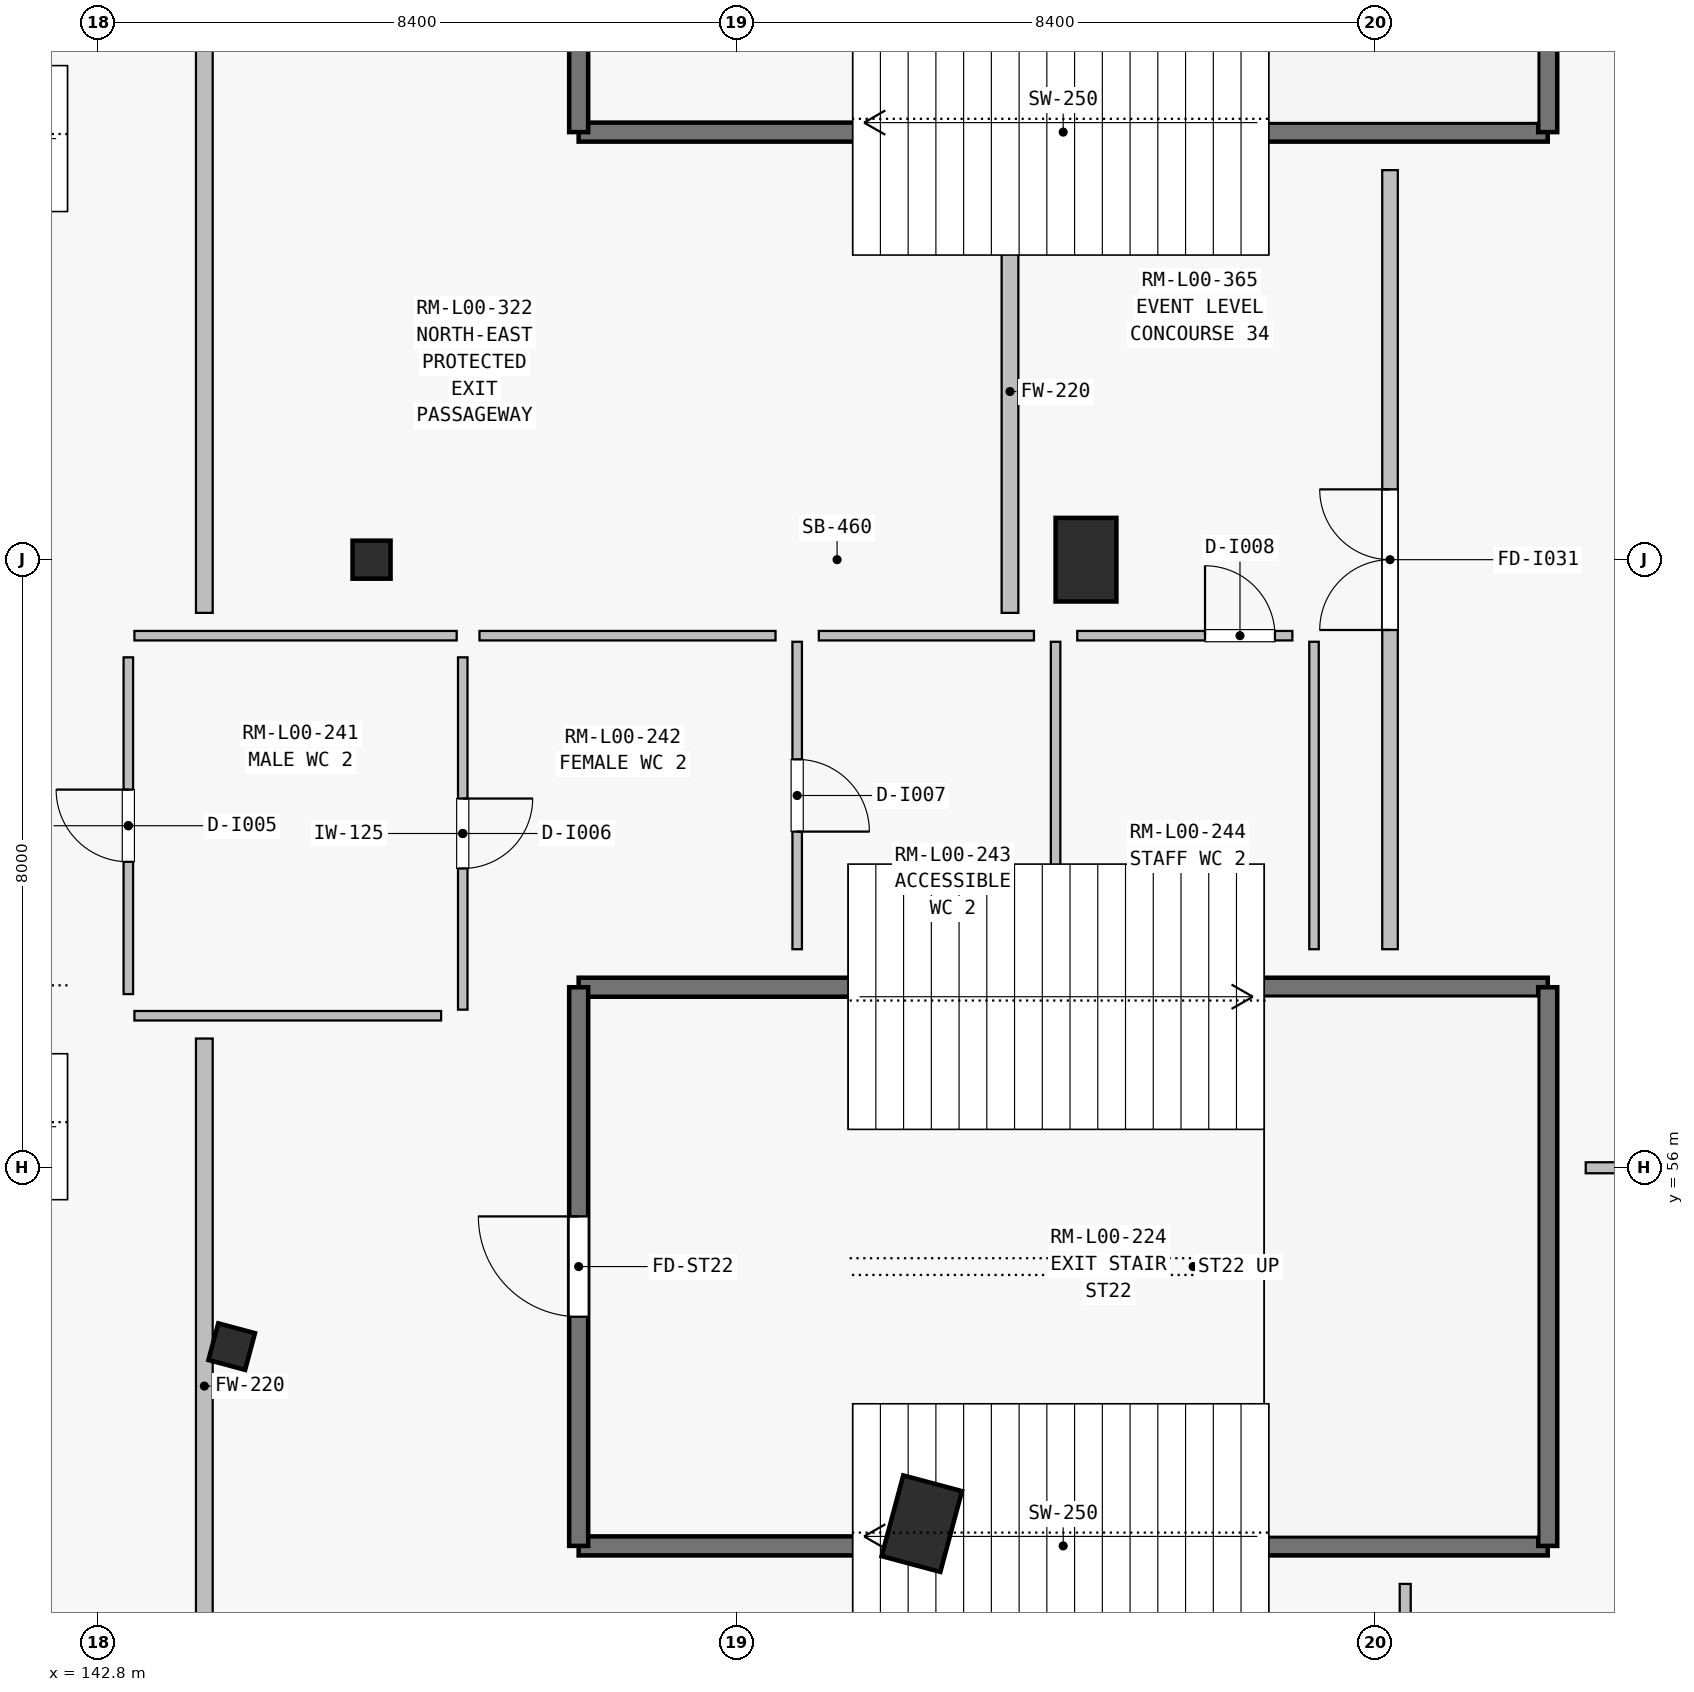
"""IFC4 building model, lengths in metres.
Left out: names, types, materials, properties, quantities, classifications, styles, units other than length and angle.
Written with IfcOpenShell. Run it as: python <this file> out.ifc"""

import sys

from ifc_helpers import new_model, si_unit, direction, frame, frame_2d, origin, origin_2d, place, context, subcontext, project, spatial, rectangle, i_section, extrude, element, fill, save


model = new_model("IFC4")
c1 = context("Model", 3, precision=1e-05, world=origin(), true_north=direction((0.0, 1.0)))
c2 = subcontext(c1, "Body", "Model", "MODEL_VIEW")
j1 = project(units=[si_unit("LENGTHUNIT", "METRE"), si_unit("PLANEANGLEUNIT", "RADIAN")], contexts=[c1])
p1 = place(None, origin())
s1 = spatial("IfcSite", under=j1, at=p1, CompositionType="ELEMENT")
p2 = place(p1, origin())
s2 = spatial("IfcBuilding", under=s1, at=p2, CompositionType="ELEMENT")
p3 = place(p2, origin())
s3 = spatial("IfcBuildingStorey", under=s2, at=p3, CompositionType="ELEMENT", Elevation=0.0)
for number, where, z_axis, x_axis in (
    (1, (146.4, 64.0, 0.0), (0.0, 0.0, 1.0), (1.0, 0.0, 0.0)),
    (2, (144.56, 53.647, 0.0), (0.0, 0.0, 1.0), (0.966, -0.259, 0.0)),
):
    element("IfcColumn", number, at=place(p3, frame(where, z_axis=z_axis, x_axis=x_axis)), inside=s3, PredefinedType="COLUMN", context=c2, shape_type="SweptSolid", body=[
        extrude(i_section(OverallWidth=0.5, OverallDepth=0.5, WebThickness=0.025, FlangeThickness=0.042, at=origin_2d()), origin(), (0.0, 0.0, 1.0), 5.4),
    ])
for number, where, z_axis, x_axis in (
    (3, (155.8, 64.0, 0.0), (0.0, 0.0, 1.0), (1.0, 0.0, 0.0)),
    (4, (153.64, 51.318, 0.0), (0.0, 0.0, 1.0), (0.966, -0.259, 0.0)),
):
    element("IfcColumn", number, at=place(p3, frame(where, z_axis=z_axis, x_axis=x_axis)), inside=s3, PredefinedType="COLUMN", context=c2, shape_type="SweptSolid", body=[
        extrude(rectangle(XDim=0.8, YDim=1.1, at=origin_2d()), origin(), (0.0, 0.0, 1.0), 5.4),
    ])
p4 = place(p3, frame((149.125, 69.625, 0.0), z_axis=(0.0, 0.0, 1.0), x_axis=(1.0, 0.0, 0.0)))
e5 = element("IfcWall", 5, at=p4, inside=s3, PredefinedType="SHEAR", context=c2, shape_type="SweptSolid", body=[
    extrude(rectangle(XDim=12.75, YDim=0.25, at=frame_2d((6.375, 0.0))), origin(), (0.0, 0.0, 1.0), 5.4),
])
p5 = place(p3, frame((149.125, 69.625, 0.0), z_axis=(0.0, 0.0, 1.0), x_axis=(0.0, 1.0, 0.0)))
e6 = element("IfcWall", 6, at=p5, inside=s3, PredefinedType="SHEAR", context=c2, shape_type="SweptSolid", body=[
    extrude(rectangle(XDim=7.35, YDim=0.25, at=frame_2d((3.675, 0.0))), origin(), (0.0, 0.0, 1.0), 5.4),
])
p6 = place(p5, frame((2.975, 0.0, 0.0)))
e7 = element("IfcOpeningElement", 7, at=p6, cuts=e6, PredefinedType="OPENING", context=c2, shape_type="SweptSolid", body=[
    extrude(rectangle(XDim=1.4, YDim=2.2, at=frame_2d((0.7, 1.1))), frame((0.0, 0.135, 0.0), z_axis=(0.0, -1.0, 0.0), x_axis=(1.0, 0.0, 0.0)), (0.0, 0.0, 1.0), 0.27),
])
p7 = place(p3, frame((161.875, 69.625, 0.0), z_axis=(0.0, 0.0, 1.0), x_axis=(0.0, 1.0, 0.0)))
e8 = element("IfcWall", 8, at=p7, inside=s3, PredefinedType="SHEAR", context=c2, shape_type="SweptSolid", body=[
    extrude(rectangle(XDim=7.35, YDim=0.25, at=frame_2d((3.675, 0.0))), origin(), (0.0, 0.0, 1.0), 5.4),
])
for number, where, z_axis, x_axis in (
    (9, (149.125, 51.025, 0.0), (0.0, 0.0, 1.0), (1.0, 0.0, 0.0)),
    (10, (149.125, 58.375, 0.0), (0.0, 0.0, 1.0), (1.0, 0.0, 0.0)),
):
    element("IfcWall", number, at=place(p3, frame(where, z_axis=z_axis, x_axis=x_axis)), inside=s3, PredefinedType="SHEAR", context=c2, shape_type="SweptSolid", body=[
        extrude(rectangle(XDim=12.75, YDim=0.25, at=frame_2d((6.375, 0.0))), origin(), (0.0, 0.0, 1.0), 5.4),
    ])
p8 = place(p3, frame((149.125, 51.025, 0.0), z_axis=(0.0, 0.0, 1.0), x_axis=(0.0, 1.0, 0.0)))
e11 = element("IfcWall", 11, at=p8, inside=s3, PredefinedType="SHEAR", context=c2, shape_type="SweptSolid", body=[
    extrude(rectangle(XDim=7.35, YDim=0.25, at=frame_2d((3.675, 0.0))), origin(), (0.0, 0.0, 1.0), 5.4),
])
p9 = place(p8, frame((3.015, 0.0, 0.0)))
e12 = element("IfcOpeningElement", 12, at=p9, cuts=e11, PredefinedType="OPENING", context=c2, shape_type="SweptSolid", body=[
    extrude(rectangle(XDim=1.32, YDim=2.2, at=frame_2d((0.66, 1.1))), frame((0.0, 0.135, 0.0), z_axis=(0.0, -1.0, 0.0), x_axis=(1.0, 0.0, 0.0)), (0.0, 0.0, 1.0), 0.27),
])
p10 = place(p3, frame((161.875, 51.025, 0.0), z_axis=(0.0, 0.0, 1.0), x_axis=(0.0, 1.0, 0.0)))
e13 = element("IfcWall", 13, at=p10, inside=s3, PredefinedType="SHEAR", context=c2, shape_type="SweptSolid", body=[
    extrude(rectangle(XDim=7.35, YDim=0.25, at=frame_2d((3.675, 0.0))), origin(), (0.0, 0.0, 1.0), 5.4),
])
p11 = place(p3, frame((143.28, 63.0, 0.0), z_axis=(0.0, 0.0, 1.0), x_axis=(1.0, 0.0, 0.0)))
e14 = element("IfcWall", 14, at=p11, inside=s3, PredefinedType="PARTITIONING", context=c2, shape_type="SweptSolid", body=[
    extrude(rectangle(XDim=4.24, YDim=0.125, at=frame_2d((2.12, 0.0))), origin(), (0.0, 0.0, 1.0), 4.295),
])
p12 = place(p3, frame((147.6, 62.715, 0.0), z_axis=(0.0, 0.0, 1.0), x_axis=(0.0, -1.0, 0.0)))
e15 = element("IfcWall", 15, at=p12, inside=s3, PredefinedType="PARTITIONING", context=c2, shape_type="SweptSolid", body=[
    extrude(rectangle(XDim=4.635, YDim=0.125, at=frame_2d((2.317, 0.0))), origin(), (0.0, 0.0, 1.0), 5.12),
])
p13 = place(p12, frame((1.858, 0.0, 0.0)))
e16 = element("IfcOpeningElement", 16, at=p13, cuts=e15, PredefinedType="OPENING", context=c2, shape_type="SweptSolid", body=[
    extrude(rectangle(XDim=0.92, YDim=2.1, at=frame_2d((0.46, 1.05))), frame((0.0, 0.073, 0.0), z_axis=(0.0, -1.0, 0.0), x_axis=(1.0, 0.0, 0.0)), (0.0, 0.0, 1.0), 0.145),
])
p14 = place(p3, frame((147.315, 58.0, 0.0), z_axis=(0.0, 0.0, 1.0), x_axis=(-1.0, 0.0, 0.0)))
e17 = element("IfcWall", 17, at=p14, inside=s3, PredefinedType="PARTITIONING", context=c2, shape_type="SweptSolid", body=[
    extrude(rectangle(XDim=4.035, YDim=0.125, at=frame_2d((2.018, 0.0))), origin(), (0.0, 0.0, 1.0), 4.295),
])
p15 = place(p3, frame((143.2, 58.285, 0.0), z_axis=(0.0, 0.0, 1.0), x_axis=(0.0, 1.0, 0.0)))
e18 = element("IfcWall", 18, at=p15, inside=s3, PredefinedType="PARTITIONING", context=c2, shape_type="SweptSolid", body=[
    extrude(rectangle(XDim=4.43, YDim=0.125, at=frame_2d((2.215, 0.0))), origin(), (0.0, 0.0, 1.0), 5.12),
])
p16 = place(p15, frame((1.74, 0.0, 0.0)))
e19 = element("IfcOpeningElement", 19, at=p16, cuts=e18, PredefinedType="OPENING", context=c2, shape_type="SweptSolid", body=[
    extrude(rectangle(XDim=0.95, YDim=2.1, at=frame_2d((0.475, 1.05))), frame((0.0, 0.073, 0.0), z_axis=(0.0, -1.0, 0.0), x_axis=(1.0, 0.0, 0.0)), (0.0, 0.0, 1.0), 0.145),
])
p17 = place(p3, frame((152.0, 62.92, 0.0), z_axis=(0.0, 0.0, 1.0), x_axis=(0.0, -1.0, 0.0)))
e20 = element("IfcWall", 20, at=p17, inside=s3, PredefinedType="PARTITIONING", context=c2, shape_type="SweptSolid", body=[
    extrude(rectangle(XDim=4.045, YDim=0.125, at=frame_2d((2.022, 0.0))), origin(), (0.0, 0.0, 1.0), 5.12),
])
p18 = place(p17, frame((1.548, 0.0, 0.0)))
e21 = element("IfcOpeningElement", 21, at=p18, cuts=e20, PredefinedType="OPENING", context=c2, shape_type="SweptSolid", body=[
    extrude(rectangle(XDim=0.95, YDim=2.1, at=frame_2d((0.475, 1.05))), frame((0.0, 0.073, 0.0), z_axis=(0.0, -1.0, 0.0), x_axis=(1.0, 0.0, 0.0)), (0.0, 0.0, 1.0), 0.145),
])
p19 = place(p3, frame((147.82, 63.0, 0.0), z_axis=(0.0, 0.0, 1.0), x_axis=(1.0, 0.0, 0.0)))
e22 = element("IfcWall", 22, at=p19, inside=s3, PredefinedType="PARTITIONING", context=c2, shape_type="SweptSolid", body=[
    extrude(rectangle(XDim=3.895, YDim=0.125, at=frame_2d((1.948, 0.0))), origin(), (0.0, 0.0, 1.0), 5.12),
])
p20 = place(p3, frame((155.4, 62.92, 0.0), z_axis=(0.0, 0.0, 1.0), x_axis=(0.0, -1.0, 0.0)))
e23 = element("IfcWall", 23, at=p20, inside=s3, PredefinedType="PARTITIONING", context=c2, shape_type="SweptSolid", body=[
    extrude(rectangle(XDim=4.045, YDim=0.125, at=frame_2d((2.022, 0.0))), origin(), (0.0, 0.0, 1.0), 5.12),
])
p21 = place(p3, frame((152.285, 63.0, 0.0), z_axis=(0.0, 0.0, 1.0), x_axis=(1.0, 0.0, 0.0)))
e24 = element("IfcWall", 24, at=p21, inside=s3, PredefinedType="PARTITIONING", context=c2, shape_type="SweptSolid", body=[
    extrude(rectangle(XDim=2.83, YDim=0.125, at=frame_2d((1.415, 0.0))), origin(), (0.0, 0.0, 1.0), 5.12),
])
p22 = place(p3, frame((158.8, 62.92, 0.0), z_axis=(0.0, 0.0, 1.0), x_axis=(0.0, -1.0, 0.0)))
e25 = element("IfcWall", 25, at=p22, inside=s3, PredefinedType="PARTITIONING", context=c2, shape_type="SweptSolid", body=[
    extrude(rectangle(XDim=4.045, YDim=0.125, at=frame_2d((2.022, 0.0))), origin(), (0.0, 0.0, 1.0), 5.12),
])
p23 = place(p3, frame((155.685, 63.0, 0.0), z_axis=(0.0, 0.0, 1.0), x_axis=(1.0, 0.0, 0.0)))
e26 = element("IfcWall", 26, at=p23, inside=s3, PredefinedType="PARTITIONING", context=c2, shape_type="SweptSolid", body=[
    extrude(rectangle(XDim=2.83, YDim=0.125, at=frame_2d((1.415, 0.0))), origin(), (0.0, 0.0, 1.0), 5.12),
])
p24 = place(p23, frame((1.681, 0.0, 0.0)))
e27 = element("IfcOpeningElement", 27, at=p24, cuts=e26, PredefinedType="OPENING", context=c2, shape_type="SweptSolid", body=[
    extrude(rectangle(XDim=0.92, YDim=2.1, at=frame_2d((0.46, 1.05))), frame((0.0, 0.073, 0.0), z_axis=(0.0, -1.0, 0.0), x_axis=(1.0, 0.0, 0.0)), (0.0, 0.0, 1.0), 0.145),
])
p25 = place(p3, frame((160.0, 48.725, 0.0), z_axis=(0.0, 0.0, 1.0), x_axis=(0.0, 1.0, 0.0)))
e28 = element("IfcWall", 28, at=p25, inside=s3, PredefinedType="PARTITIONING", context=c2, shape_type="SweptSolid", body=[
    extrude(rectangle(XDim=1.8, YDim=0.145, at=frame_2d((0.9, 0.0))), origin(), (0.0, 0.0, 1.0), 5.12),
])
p26 = place(p3, frame((162.375, 56.0, 0.0), z_axis=(0.0, 0.0, 1.0), x_axis=(1.0, 0.0, 0.0)))
e29 = element("IfcWall", 29, at=p26, inside=s3, PredefinedType="PARTITIONING", context=c2, shape_type="SweptSolid", body=[
    extrude(rectangle(XDim=21.715, YDim=0.145, at=frame_2d((10.857, 0.0))), origin(), (0.0, 0.0, 1.0), 4.295),
])
p27 = place(p26, frame((10.317, 0.0, 0.0)))
e30 = element("IfcOpeningElement", 30, at=p27, cuts=e29, PredefinedType="OPENING", context=c2, shape_type="SweptSolid", body=[
    extrude(rectangle(XDim=1.08, YDim=2.15, at=frame_2d((0.54, 1.075))), frame((0.0, 0.083, 0.0), z_axis=(0.0, -1.0, 0.0), x_axis=(1.0, 0.0, 0.0)), (0.0, 0.0, 1.0), 0.165),
])
p28 = place(p3, frame((159.8, 58.875, 0.0), z_axis=(0.0, 0.0, 1.0), x_axis=(0.0, 1.0, 0.0)))
e31 = element("IfcWall", 31, at=p28, inside=s3, PredefinedType="SOLIDWALL", context=c2, shape_type="SweptSolid", body=[
    extrude(rectangle(XDim=10.25, YDim=0.205, at=frame_2d((5.125, 0.0))), origin(), (0.0, 0.0, 1.0), 4.483),
])
p29 = place(p28, frame((4.2, 0.0, 0.0)))
e32 = element("IfcOpeningElement", 32, at=p29, cuts=e31, PredefinedType="OPENING", context=c2, shape_type="SweptSolid", body=[
    extrude(rectangle(XDim=1.85, YDim=2.4, at=frame_2d((0.925, 1.2))), frame((0.0, 0.113, 0.0), z_axis=(0.0, -1.0, 0.0), x_axis=(1.0, 0.0, 0.0)), (0.0, 0.0, 1.0), 0.225),
])
p30 = place(p3, frame((144.2, 63.3, 0.0), z_axis=(0.0, 0.0, 1.0), x_axis=(0.0, 1.0, 0.0)))
e33 = element("IfcWall", 33, at=p30, inside=s3, PredefinedType="SOLIDWALL", context=c2, shape_type="SweptSolid", body=[
    extrude(rectangle(XDim=16.144, YDim=0.22, at=frame_2d((8.072, 0.0))), origin(), (0.0, 0.0, 1.0), 4.295),
])
p31 = place(p3, frame((154.8, 69.125, 0.0), z_axis=(0.0, 0.0, 1.0), x_axis=(0.0, -1.0, 0.0)))
e34 = element("IfcWall", 34, at=p31, inside=s3, PredefinedType="SOLIDWALL", context=c2, shape_type="SweptSolid", body=[
    extrude(rectangle(XDim=5.825, YDim=0.22, at=frame_2d((2.913, 0.0))), origin(), (0.0, 0.0, 1.0), 4.483),
])
p32 = place(p3, frame((154.8, 50.525, 0.0), z_axis=(0.0, 0.0, 1.0), x_axis=(0.0, -1.0, 0.0)))
e35 = element("IfcWall", 35, at=p32, inside=s3, PredefinedType="SOLIDWALL", context=c2, shape_type="SweptSolid", body=[
    extrude(rectangle(XDim=2.445, YDim=0.22, at=frame_2d((1.222, 0.0))), origin(), (0.0, 0.0, 1.0), 5.12),
])
p33 = place(p3, frame((144.2, 48.556, 0.0), z_axis=(0.0, 0.0, 1.0), x_axis=(0.0, 1.0, 0.0)))
e36 = element("IfcWall", 36, at=p33, inside=s3, PredefinedType="SOLIDWALL", context=c2, shape_type="SweptSolid", body=[
    extrude(rectangle(XDim=9.144, YDim=0.22, at=frame_2d((4.572, 0.0))), origin(), (0.0, 0.0, 1.0), 4.483),
])
p34 = place(p9, origin())
e37 = element("IfcDoor", 37, at=p34, inside=s3, OperationType="SINGLE_SWING_RIGHT", PredefinedType="DOOR", context=c2, shape_type="SweptSolid", body=[
    extrude(rectangle(XDim=1.32, YDim=2.2, at=frame_2d((0.66, 1.1))), frame((0.0, 0.025, 0.0), z_axis=(0.0, -1.0, 0.0), x_axis=(1.0, 0.0, 0.0)), (0.0, 0.0, 1.0), 0.05),
])
fill(e12, e37)
p35 = place(p16, origin())
e38 = element("IfcDoor", 38, at=p35, inside=s3, OperationType="SINGLE_SWING_RIGHT", PredefinedType="DOOR", context=c2, shape_type="SweptSolid", body=[
    extrude(rectangle(XDim=0.95, YDim=2.1, at=frame_2d((0.475, 1.05))), frame((0.0, 0.025, 0.0), z_axis=(0.0, -1.0, 0.0), x_axis=(1.0, 0.0, 0.0)), (0.0, 0.0, 1.0), 0.05),
])
fill(e19, e38)
p36 = place(p13, origin())
e39 = element("IfcDoor", 39, at=p36, inside=s3, OperationType="SINGLE_SWING_LEFT", PredefinedType="DOOR", context=c2, shape_type="SweptSolid", body=[
    extrude(rectangle(XDim=0.92, YDim=2.1, at=frame_2d((0.46, 1.05))), frame((0.0, 0.025, 0.0), z_axis=(0.0, -1.0, 0.0), x_axis=(1.0, 0.0, 0.0)), (0.0, 0.0, 1.0), 0.05),
])
fill(e16, e39)
p37 = place(p18, origin())
e40 = element("IfcDoor", 40, at=p37, inside=s3, OperationType="SINGLE_SWING_RIGHT", PredefinedType="DOOR", context=c2, shape_type="SweptSolid", body=[
    extrude(rectangle(XDim=0.95, YDim=2.1, at=frame_2d((0.475, 1.05))), frame((0.0, 0.025, 0.0), z_axis=(0.0, -1.0, 0.0), x_axis=(1.0, 0.0, 0.0)), (0.0, 0.0, 1.0), 0.05),
])
fill(e21, e40)
p38 = place(p24, origin())
e41 = element("IfcDoor", 41, at=p38, inside=s3, OperationType="SINGLE_SWING_LEFT", PredefinedType="DOOR", context=c2, shape_type="SweptSolid", body=[
    extrude(rectangle(XDim=0.92, YDim=2.1, at=frame_2d((0.46, 1.05))), frame((0.0, 0.025, 0.0), z_axis=(0.0, -1.0, 0.0), x_axis=(1.0, 0.0, 0.0)), (0.0, 0.0, 1.0), 0.05),
])
fill(e27, e41)
p39 = place(p29, origin())
e42 = element("IfcDoor", 42, at=p39, inside=s3, OperationType="DOUBLE_DOOR_SINGLE_SWING", PredefinedType="DOOR", context=c2, shape_type="SweptSolid", body=[
    extrude(rectangle(XDim=1.85, YDim=2.4, at=frame_2d((0.925, 1.2))), frame((0.0, 0.025, 0.0), z_axis=(0.0, -1.0, 0.0), x_axis=(1.0, 0.0, 0.0)), (0.0, 0.0, 1.0), 0.05),
])
fill(e32, e42)
save(model, sys.argv[1])
